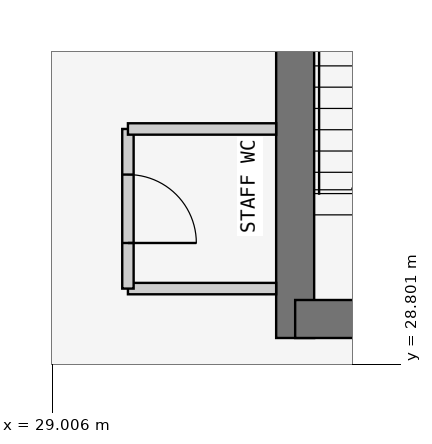
"""IFC4 building model, lengths in metres.
Left out: names, types, materials, properties, quantities, classifications, styles, units other than length and angle.
Written with IfcOpenShell. Run it as: python <this file> out.ifc"""

import sys

from ifc_helpers import new_model, si_unit, direction, frame, frame_2d, origin, place, context, subcontext, project, spatial, rectangle, extrude, element, fill, save


model = new_model("IFC4")
c1 = context("Model", 3, precision=1e-05, world=origin(), true_north=direction((0.0, 1.0)))
c2 = subcontext(c1, "Body", "Model", "MODEL_VIEW")
j1 = project(units=[si_unit("LENGTHUNIT", "METRE"), si_unit("PLANEANGLEUNIT", "RADIAN")], contexts=[c1])
p1 = place(None, origin())
s1 = spatial("IfcSite", under=j1, at=p1, CompositionType="ELEMENT")
p2 = place(p1, origin())
s2 = spatial("IfcBuilding", under=s1, at=p2, CompositionType="ELEMENT")
p3 = place(p2, frame((0.0, 0.0, 34.5)))
s3 = spatial("IfcBuildingStorey", under=s2, at=p3, CompositionType="ELEMENT", Elevation=34.5)
p4 = place(p3, frame((32.2, 29.15, 0.0), z_axis=(0.0, 0.0, 1.0), x_axis=(0.0, 1.0, 0.0)))
e1 = element("IfcWall", 1, at=p4, inside=s3, PredefinedType="SHEAR", context=c2, shape_type="SweptSolid", body=[
    extrude(rectangle(XDim=8.65, YDim=0.5, at=frame_2d((4.325, 0.0))), origin(), (0.0, 0.0, 1.0), 3.6),
])
p5 = place(p3, frame((32.2, 29.4, 0.0), z_axis=(0.0, 0.0, 1.0), x_axis=(1.0, 0.0, 0.0)))
e2 = element("IfcWall", 2, at=p5, inside=s3, PredefinedType="SHEAR", context=c2, shape_type="SweptSolid", body=[
    extrude(rectangle(XDim=5.6, YDim=0.5, at=frame_2d((2.8, 0.0))), origin(), (0.0, 0.0, 1.0), 3.6),
])
p6 = place(p5, frame((2.0, 0.0, 0.0)))
e3 = element("IfcOpeningElement", 3, at=p6, cuts=e2, PredefinedType="OPENING", context=c2, shape_type="SweptSolid", body=[
    extrude(rectangle(XDim=1.2, YDim=2.1, at=frame_2d((0.6, 1.05))), frame((0.0, 0.26, 0.0), z_axis=(0.0, -1.0, 0.0), x_axis=(1.0, 0.0, 0.0)), (0.0, 0.0, 1.0), 0.52),
])
p7 = place(p3, frame((31.95, 29.8, 0.0), z_axis=(0.0, 0.0, 1.0), x_axis=(-1.0, 0.0, 0.0)))
e4 = element("IfcWall", 4, at=p7, inside=s3, PredefinedType="PARTITIONING", context=c2, shape_type="SweptSolid", body=[
    extrude(rectangle(XDim=1.95, YDim=0.15, at=frame_2d((0.975, 0.0))), origin(), (0.0, 0.0, 1.0), 3.45),
])
p8 = place(p3, frame((30.0, 29.8, 0.0), z_axis=(0.0, 0.0, 1.0), x_axis=(0.0, 1.0, 0.0)))
e5 = element("IfcWall", 5, at=p8, inside=s3, PredefinedType="PARTITIONING", context=c2, shape_type="SweptSolid", body=[
    extrude(rectangle(XDim=2.1, YDim=0.15, at=frame_2d((1.05, 0.0))), origin(), (0.0, 0.0, 1.0), 3.45),
])
p9 = place(p8, frame((0.6, 0.0, 0.0)))
e6 = element("IfcOpeningElement", 6, at=p9, cuts=e5, PredefinedType="OPENING", context=c2, shape_type="SweptSolid", body=[
    extrude(rectangle(XDim=0.9, YDim=2.1, at=frame_2d((0.45, 1.05))), frame((0.0, 0.085, 0.0), z_axis=(0.0, -1.0, 0.0), x_axis=(1.0, 0.0, 0.0)), (0.0, 0.0, 1.0), 0.17),
])
p10 = place(p3, frame((30.0, 31.9, 0.0), z_axis=(0.0, 0.0, 1.0), x_axis=(1.0, 0.0, 0.0)))
e7 = element("IfcWall", 7, at=p10, inside=s3, PredefinedType="PARTITIONING", context=c2, shape_type="SweptSolid", body=[
    extrude(rectangle(XDim=1.95, YDim=0.15, at=frame_2d((0.975, 0.0))), origin(), (0.0, 0.0, 1.0), 3.45),
])
p11 = place(p9, frame((0.9, 0.0, 0.0), z_axis=(0.0, 0.0, 1.0), x_axis=(-1.0, 0.0, 0.0)))
e8 = element("IfcDoor", 8, at=p11, inside=s3, OperationType="SINGLE_SWING_RIGHT", PredefinedType="DOOR", context=c2, shape_type="SweptSolid", body=[
    extrude(rectangle(XDim=0.9, YDim=2.1, at=frame_2d((0.45, 1.05))), frame((0.0, 0.025, 0.0), z_axis=(0.0, -1.0, 0.0), x_axis=(1.0, 0.0, 0.0)), (0.0, 0.0, 1.0), 0.05),
])
fill(e6, e8)
save(model, sys.argv[1])
